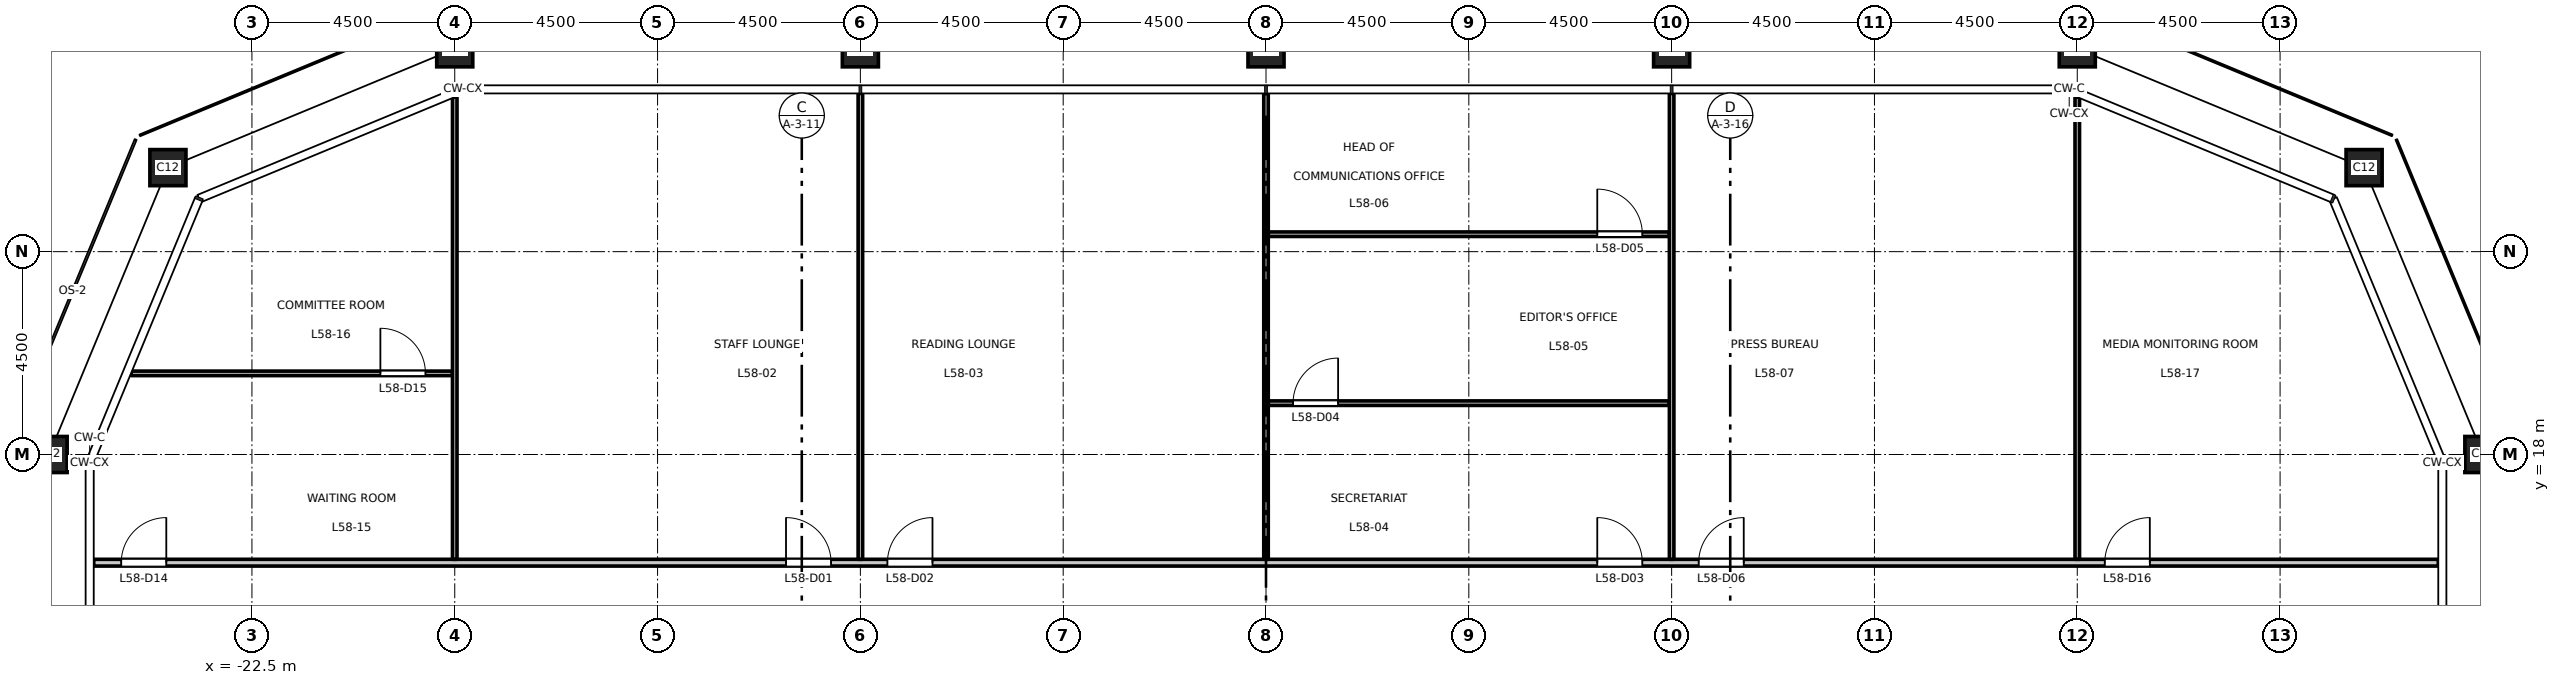
"""IFC4 building model, lengths in metres.
Left out: names, types, materials, properties, quantities, classifications, styles, units other than length and angle.
Written with IfcOpenShell. Run it as: python <this file> out.ifc"""

import sys

from ifc_helpers import new_model, si_unit, direction, frame, frame_2d, origin, origin_2d, place, context, subcontext, project, spatial, rectangle, hollow_rectangle, extrude, element, fill, save


model = new_model("IFC4")
c1 = context("Model", 3, precision=1e-05, world=origin(), true_north=direction((0.0, 1.0)))
c2 = subcontext(c1, "Body", "Model", "MODEL_VIEW")
j1 = project(units=[si_unit("LENGTHUNIT", "METRE"), si_unit("PLANEANGLEUNIT", "RADIAN")], contexts=[c1])
p1 = place(None, origin())
s1 = spatial("IfcSite", under=j1, at=p1, CompositionType="ELEMENT")
p2 = place(p1, origin())
s2 = spatial("IfcBuilding", under=s1, at=p2, CompositionType="ELEMENT")
p3 = place(p2, frame((0.0, 0.0, 269.2)))
s3 = spatial("IfcBuildingStorey", under=s2, at=p3, CompositionType="ELEMENT", Elevation=269.2)
for number, where, z_axis, x_axis in (
    (1, (27.0, 18.0, 0.0), (0.0, 0.0, 1.0), (1.0, 0.0, 0.0)),
    (2, (24.364, 24.364, 0.0), (0.0, 0.0, 1.0), (1.0, 0.0, 0.0)),
    (3, (18.0, 27.0, 0.0), (0.0, 0.0, 1.0), (1.0, 0.0, 0.0)),
    (4, (9.0, 27.0, 0.0), (0.0, 0.0, 1.0), (1.0, 0.0, 0.0)),
    (5, (0.0, 27.0, 0.0), (0.0, 0.0, 1.0), (1.0, 0.0, 0.0)),
    (6, (-9.0, 27.0, 0.0), (0.0, 0.0, 1.0), (1.0, 0.0, 0.0)),
    (7, (-18.0, 27.0, 0.0), (0.0, 0.0, 1.0), (1.0, 0.0, 0.0)),
    (8, (-24.364, 24.364, 0.0), (0.0, 0.0, 1.0), (1.0, 0.0, 0.0)),
    (9, (-27.0, 18.0, 0.0), (0.0, 0.0, 1.0), (1.0, 0.0, 0.0)),
):
    element("IfcColumn", number, at=place(p3, frame(where, z_axis=z_axis, x_axis=x_axis)), inside=s3, PredefinedType="COLUMN", context=c2, shape_type="SweptSolid", body=[
        extrude(hollow_rectangle(XDim=0.8, YDim=0.8, WallThickness=0.045, at=origin_2d()), origin(), (0.0, 0.0, 1.0), 4.5),
    ])
p4 = place(p3, frame((-26.01, 15.6, 0.0), z_axis=(0.0, 0.0, 1.0), x_axis=(1.0, 0.0, 0.0)))
e10 = element("IfcWall", 10, at=p4, inside=s3, PredefinedType="PARTITIONING", context=c2, shape_type="SweptSolid", body=[
    extrude(rectangle(XDim=52.02, YDim=0.15, at=frame_2d((26.01, 0.0))), origin(), (0.0, 0.0, 1.0), 4.35),
])
p5 = place(p4, frame((15.36, 0.0, 0.0)))
e11 = element("IfcOpeningElement", 11, at=p5, cuts=e10, PredefinedType="OPENING", context=c2, shape_type="SweptSolid", body=[
    extrude(rectangle(XDim=1.0, YDim=2.1, at=frame_2d((0.5, 1.05))), frame((0.0, 0.085, 0.0), z_axis=(0.0, -1.0, 0.0), x_axis=(1.0, 0.0, 0.0)), (0.0, 0.0, 1.0), 0.17),
])
p6 = place(p4, frame((17.61, 0.0, 0.0)))
e12 = element("IfcOpeningElement", 12, at=p6, cuts=e10, PredefinedType="OPENING", context=c2, shape_type="SweptSolid", body=[
    extrude(rectangle(XDim=1.0, YDim=2.1, at=frame_2d((0.5, 1.05))), frame((0.0, 0.085, 0.0), z_axis=(0.0, -1.0, 0.0), x_axis=(1.0, 0.0, 0.0)), (0.0, 0.0, 1.0), 0.17),
])
p7 = place(p4, frame((33.36, 0.0, 0.0)))
e13 = element("IfcOpeningElement", 13, at=p7, cuts=e10, PredefinedType="OPENING", context=c2, shape_type="SweptSolid", body=[
    extrude(rectangle(XDim=1.0, YDim=2.1, at=frame_2d((0.5, 1.05))), frame((0.0, 0.085, 0.0), z_axis=(0.0, -1.0, 0.0), x_axis=(1.0, 0.0, 0.0)), (0.0, 0.0, 1.0), 0.17),
])
p8 = place(p4, frame((35.61, 0.0, 0.0)))
e14 = element("IfcOpeningElement", 14, at=p8, cuts=e10, PredefinedType="OPENING", context=c2, shape_type="SweptSolid", body=[
    extrude(rectangle(XDim=1.0, YDim=2.1, at=frame_2d((0.5, 1.05))), frame((0.0, 0.085, 0.0), z_axis=(0.0, -1.0, 0.0), x_axis=(1.0, 0.0, 0.0)), (0.0, 0.0, 1.0), 0.17),
])
p9 = place(p4, frame((0.61, 0.0, 0.0)))
e15 = element("IfcOpeningElement", 15, at=p9, cuts=e10, PredefinedType="OPENING", context=c2, shape_type="SweptSolid", body=[
    extrude(rectangle(XDim=1.0, YDim=2.1, at=frame_2d((0.5, 1.05))), frame((0.0, 0.085, 0.0), z_axis=(0.0, -1.0, 0.0), x_axis=(1.0, 0.0, 0.0)), (0.0, 0.0, 1.0), 0.17),
])
p10 = place(p4, frame((44.62, 0.0, 0.0)))
e16 = element("IfcOpeningElement", 16, at=p10, cuts=e10, PredefinedType="OPENING", context=c2, shape_type="SweptSolid", body=[
    extrude(rectangle(XDim=1.0, YDim=2.1, at=frame_2d((0.5, 1.05))), frame((0.0, 0.085, 0.0), z_axis=(0.0, -1.0, 0.0), x_axis=(1.0, 0.0, 0.0)), (0.0, 0.0, 1.0), 0.17),
])
p11 = place(p3, frame((0.05, 19.139, 0.0), z_axis=(0.0, 0.0, 1.0), x_axis=(1.0, 0.0, 0.0)))
e17 = element("IfcWall", 17, at=p11, inside=s3, PredefinedType="PARTITIONING", context=c2, shape_type="SweptSolid", body=[
    extrude(rectangle(XDim=8.9, YDim=0.1, at=frame_2d((4.45, 0.0))), origin(), (0.0, 0.0, 1.0), 4.35),
])
p12 = place(p11, frame((0.55, 0.0, 0.0)))
e18 = element("IfcOpeningElement", 18, at=p12, cuts=e17, PredefinedType="OPENING", context=c2, shape_type="SweptSolid", body=[
    extrude(rectangle(XDim=1.0, YDim=2.1, at=frame_2d((0.5, 1.05))), frame((0.0, 0.06, 0.0), z_axis=(0.0, -1.0, 0.0), x_axis=(1.0, 0.0, 0.0)), (0.0, 0.0, 1.0), 0.12),
])
p13 = place(p3, frame((-25.183, 19.8, 0.0), z_axis=(0.0, 0.0, 1.0), x_axis=(1.0, 0.0, 0.0)))
e19 = element("IfcWall", 19, at=p13, inside=s3, PredefinedType="PARTITIONING", context=c2, shape_type="SweptSolid", body=[
    extrude(rectangle(XDim=7.133, YDim=0.1, at=frame_2d((3.566, 0.0))), origin(), (0.0, 0.0, 1.0), 4.35),
])
p14 = place(p13, frame((5.533, 0.0, 0.0)))
e20 = element("IfcOpeningElement", 20, at=p14, cuts=e19, PredefinedType="OPENING", context=c2, shape_type="SweptSolid", body=[
    extrude(rectangle(XDim=1.0, YDim=2.1, at=frame_2d((0.5, 1.05))), frame((0.0, 0.06, 0.0), z_axis=(0.0, -1.0, 0.0), x_axis=(1.0, 0.0, 0.0)), (0.0, 0.0, 1.0), 0.12),
])
p15 = place(p3, frame((0.05, 22.887, 0.0), z_axis=(0.0, 0.0, 1.0), x_axis=(1.0, 0.0, 0.0)))
e21 = element("IfcWall", 21, at=p15, inside=s3, PredefinedType="PARTITIONING", context=c2, shape_type="SweptSolid", body=[
    extrude(rectangle(XDim=8.9, YDim=0.1, at=frame_2d((4.45, 0.0))), origin(), (0.0, 0.0, 1.0), 4.35),
])
p16 = place(p15, frame((7.3, 0.0, 0.0)))
e22 = element("IfcOpeningElement", 22, at=p16, cuts=e21, PredefinedType="OPENING", context=c2, shape_type="SweptSolid", body=[
    extrude(rectangle(XDim=1.0, YDim=2.1, at=frame_2d((0.5, 1.05))), frame((0.0, 0.06, 0.0), z_axis=(0.0, -1.0, 0.0), x_axis=(1.0, 0.0, 0.0)), (0.0, 0.0, 1.0), 0.12),
])
p17 = place(p3, frame((-18.0, 15.675, 0.0), z_axis=(0.0, 0.0, 1.0), x_axis=(0.0, 1.0, 0.0)))
e23 = element("IfcWall", 23, at=p17, inside=s3, PredefinedType="PARTITIONING", context=c2, shape_type="SweptSolid", body=[
    extrude(rectangle(XDim=10.253, YDim=0.1, at=frame_2d((5.126, 0.0))), origin(), (0.0, 0.0, 1.0), 3.65),
])
p18 = place(p3, frame((-9.0, 15.675, 0.0), z_axis=(0.0, 0.0, 1.0), x_axis=(0.0, 1.0, 0.0)))
e24 = element("IfcWall", 24, at=p18, inside=s3, PredefinedType="PARTITIONING", context=c2, shape_type="SweptSolid", body=[
    extrude(rectangle(XDim=10.335, YDim=0.1, at=frame_2d((5.167, 0.0))), origin(), (0.0, 0.0, 1.0), 3.65),
])
p19 = place(p3, frame((0.0, 15.675, 0.0), z_axis=(0.0, 0.0, 1.0), x_axis=(0.0, 1.0, 0.0)))
e25 = element("IfcWall", 25, at=p19, inside=s3, PredefinedType="PARTITIONING", context=c2, shape_type="SweptSolid", body=[
    extrude(rectangle(XDim=10.335, YDim=0.1, at=frame_2d((5.167, 0.0))), origin(), (0.0, 0.0, 1.0), 3.55),
])
p20 = place(p3, frame((9.0, 15.675, 0.0), z_axis=(0.0, 0.0, 1.0), x_axis=(0.0, 1.0, 0.0)))
e26 = element("IfcWall", 26, at=p20, inside=s3, PredefinedType="PARTITIONING", context=c2, shape_type="SweptSolid", body=[
    extrude(rectangle(XDim=10.335, YDim=0.1, at=frame_2d((5.167, 0.0))), origin(), (0.0, 0.0, 1.0), 3.65),
])
p21 = place(p3, frame((18.0, 15.675, 0.0), z_axis=(0.0, 0.0, 1.0), x_axis=(0.0, 1.0, 0.0)))
e27 = element("IfcWall", 27, at=p21, inside=s3, PredefinedType="PARTITIONING", context=c2, shape_type="SweptSolid", body=[
    extrude(rectangle(XDim=10.253, YDim=0.1, at=frame_2d((5.126, 0.0))), origin(), (0.0, 0.0, 1.0), 3.65),
])
p22 = place(p5, origin())
e28 = element("IfcDoor", 28, at=p22, inside=s3, OperationType="SINGLE_SWING_LEFT", PredefinedType="DOOR", context=c2, shape_type="SweptSolid", body=[
    extrude(rectangle(XDim=1.0, YDim=2.1, at=frame_2d((0.5, 1.05))), frame((0.0, 0.025, 0.0), z_axis=(0.0, -1.0, 0.0), x_axis=(1.0, 0.0, 0.0)), (0.0, 0.0, 1.0), 0.05),
])
fill(e11, e28)
p23 = place(p6, origin())
e29 = element("IfcDoor", 29, at=p23, inside=s3, OperationType="SINGLE_SWING_RIGHT", PredefinedType="DOOR", context=c2, shape_type="SweptSolid", body=[
    extrude(rectangle(XDim=1.0, YDim=2.1, at=frame_2d((0.5, 1.05))), frame((0.0, 0.025, 0.0), z_axis=(0.0, -1.0, 0.0), x_axis=(1.0, 0.0, 0.0)), (0.0, 0.0, 1.0), 0.05),
])
fill(e12, e29)
p24 = place(p7, origin())
e30 = element("IfcDoor", 30, at=p24, inside=s3, OperationType="SINGLE_SWING_LEFT", PredefinedType="DOOR", context=c2, shape_type="SweptSolid", body=[
    extrude(rectangle(XDim=1.0, YDim=2.1, at=frame_2d((0.5, 1.05))), frame((0.0, 0.025, 0.0), z_axis=(0.0, -1.0, 0.0), x_axis=(1.0, 0.0, 0.0)), (0.0, 0.0, 1.0), 0.05),
])
fill(e13, e30)
p25 = place(p12, origin())
e31 = element("IfcDoor", 31, at=p25, inside=s3, OperationType="SINGLE_SWING_RIGHT", PredefinedType="DOOR", context=c2, shape_type="SweptSolid", body=[
    extrude(rectangle(XDim=1.0, YDim=2.1, at=frame_2d((0.5, 1.05))), frame((0.0, 0.025, 0.0), z_axis=(0.0, -1.0, 0.0), x_axis=(1.0, 0.0, 0.0)), (0.0, 0.0, 1.0), 0.05),
])
fill(e18, e31)
p26 = place(p16, origin())
e32 = element("IfcDoor", 32, at=p26, inside=s3, OperationType="SINGLE_SWING_LEFT", PredefinedType="DOOR", context=c2, shape_type="SweptSolid", body=[
    extrude(rectangle(XDim=1.0, YDim=2.1, at=frame_2d((0.5, 1.05))), frame((0.0, 0.025, 0.0), z_axis=(0.0, -1.0, 0.0), x_axis=(1.0, 0.0, 0.0)), (0.0, 0.0, 1.0), 0.05),
])
fill(e22, e32)
p27 = place(p8, origin())
e33 = element("IfcDoor", 33, at=p27, inside=s3, OperationType="SINGLE_SWING_RIGHT", PredefinedType="DOOR", context=c2, shape_type="SweptSolid", body=[
    extrude(rectangle(XDim=1.0, YDim=2.1, at=frame_2d((0.5, 1.05))), frame((0.0, 0.025, 0.0), z_axis=(0.0, -1.0, 0.0), x_axis=(1.0, 0.0, 0.0)), (0.0, 0.0, 1.0), 0.05),
])
fill(e14, e33)
p28 = place(p9, origin())
e34 = element("IfcDoor", 34, at=p28, inside=s3, OperationType="SINGLE_SWING_RIGHT", PredefinedType="DOOR", context=c2, shape_type="SweptSolid", body=[
    extrude(rectangle(XDim=1.0, YDim=2.1, at=frame_2d((0.5, 1.05))), frame((0.0, 0.025, 0.0), z_axis=(0.0, -1.0, 0.0), x_axis=(1.0, 0.0, 0.0)), (0.0, 0.0, 1.0), 0.05),
])
fill(e15, e34)
p29 = place(p14, origin())
e35 = element("IfcDoor", 35, at=p29, inside=s3, OperationType="SINGLE_SWING_LEFT", PredefinedType="DOOR", context=c2, shape_type="SweptSolid", body=[
    extrude(rectangle(XDim=1.0, YDim=2.1, at=frame_2d((0.5, 1.05))), frame((0.0, 0.025, 0.0), z_axis=(0.0, -1.0, 0.0), x_axis=(1.0, 0.0, 0.0)), (0.0, 0.0, 1.0), 0.05),
])
fill(e20, e35)
p30 = place(p10, origin())
e36 = element("IfcDoor", 36, at=p30, inside=s3, OperationType="SINGLE_SWING_RIGHT", PredefinedType="DOOR", context=c2, shape_type="SweptSolid", body=[
    extrude(rectangle(XDim=1.0, YDim=2.1, at=frame_2d((0.5, 1.05))), frame((0.0, 0.025, 0.0), z_axis=(0.0, -1.0, 0.0), x_axis=(1.0, 0.0, 0.0)), (0.0, 0.0, 1.0), 0.05),
])
fill(e16, e36)
save(model, sys.argv[1])
